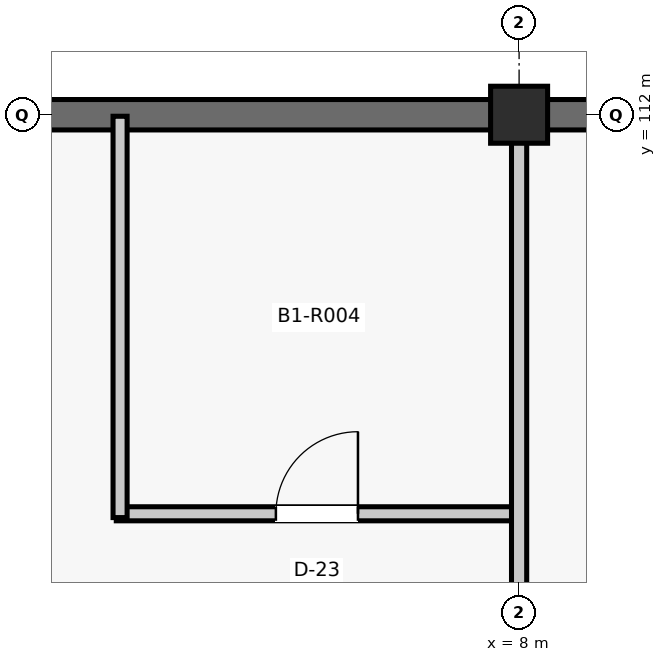
"""IFC4 building model, lengths in metres.
Left out: names, types, materials, properties, quantities, classifications, styles, units other than length and angle.
Written with IfcOpenShell. Run it as: python <this file> out.ifc"""

import sys

from ifc_helpers import new_model, si_unit, direction, frame, frame_2d, origin, origin_2d, place, context, subcontext, project, spatial, rectangle, extrude, element, fill, save


model = new_model("IFC4")
c1 = context("Model", 3, precision=1e-05, world=origin(), true_north=direction((0.0, 1.0)))
c2 = subcontext(c1, "Body", "Model", "MODEL_VIEW")
j1 = project(units=[si_unit("LENGTHUNIT", "METRE"), si_unit("PLANEANGLEUNIT", "RADIAN")], contexts=[c1])
p1 = place(None, origin())
s1 = spatial("IfcSite", under=j1, at=p1, CompositionType="ELEMENT")
p2 = place(p1, origin())
s2 = spatial("IfcBuilding", under=s1, at=p2, CompositionType="ELEMENT")
p3 = place(p2, frame((0.0, 0.0, -4.29)))
s3 = spatial("IfcBuildingStorey", under=s2, at=p3, CompositionType="ELEMENT", Elevation=-4.29)
p4 = place(p3, frame((8.0, 112.0, 0.0), z_axis=(0.0, 0.0, 1.0), x_axis=(1.0, 0.0, 0.0)))
e1 = element("IfcColumn", 1, at=p4, inside=s3, PredefinedType="COLUMN", context=c2, shape_type="SweptSolid", body=[
    extrude(rectangle(XDim=0.75, YDim=0.75, at=origin_2d()), origin(), (0.0, 0.0, 1.0), 4.29),
])
p5 = place(p3, frame((0.36, 112.0, 0.0), z_axis=(0.0, 0.0, 1.0), x_axis=(1.0, 0.0, 0.0)))
e2 = element("IfcWall", 2, at=p5, inside=s3, PredefinedType="SHEAR", context=c2, shape_type="SweptSolid", body=[
    extrude(rectangle(XDim=7.28, YDim=0.4, at=frame_2d((3.64, 0.0))), origin(), (0.0, 0.0, 1.0), 3.654),
])
p6 = place(p3, frame((8.36, 112.0, 0.0), z_axis=(0.0, 0.0, 1.0), x_axis=(1.0, 0.0, 0.0)))
e3 = element("IfcWall", 3, at=p6, inside=s3, PredefinedType="SHEAR", context=c2, shape_type="SweptSolid", body=[
    extrude(rectangle(XDim=7.28, YDim=0.4, at=frame_2d((3.64, 0.0))), origin(), (0.0, 0.0, 1.0), 3.594),
])
p7 = place(p3, frame((2.7, 106.75, 0.0), z_axis=(0.0, 0.0, 1.0), x_axis=(1.0, 0.0, 0.0)))
e4 = element("IfcWall", 4, at=p7, inside=s3, PredefinedType="PARTITIONING", context=c2, shape_type="SweptSolid", body=[
    extrude(rectangle(XDim=5.28, YDim=0.185, at=frame_2d((2.64, 0.0))), origin(), (0.0, 0.0, 1.0), 3.384),
])
p8 = place(p7, frame((2.1, 0.0, 0.0)))
e5 = element("IfcOpeningElement", 5, at=p8, cuts=e4, PredefinedType="OPENING", context=c2, shape_type="SweptSolid", body=[
    extrude(rectangle(XDim=1.08, YDim=2.2, at=frame_2d((0.54, 1.1))), frame((0.0, 0.103, 0.0), z_axis=(0.0, -1.0, 0.0), x_axis=(1.0, 0.0, 0.0)), (0.0, 0.0, 1.0), 0.205),
])
p9 = place(p3, frame((2.75, 106.7, 0.0), z_axis=(0.0, 0.0, 1.0), x_axis=(0.0, 1.0, 0.0)))
e6 = element("IfcWall", 6, at=p9, inside=s3, PredefinedType="PARTITIONING", context=c2, shape_type="SweptSolid", body=[
    extrude(rectangle(XDim=5.28, YDim=0.185, at=frame_2d((2.64, 0.0))), origin(), (0.0, 0.0, 1.0), 3.647),
])
p10 = place(p3, frame((8.0, 104.365, 0.0), z_axis=(0.0, 0.0, 1.0), x_axis=(0.0, 1.0, 0.0)))
e7 = element("IfcWall", 7, at=p10, inside=s3, PredefinedType="PARTITIONING", context=c2, shape_type="SweptSolid", body=[
    extrude(rectangle(XDim=7.27, YDim=0.2, at=frame_2d((3.635, 0.0))), origin(), (0.0, 0.0, 1.0), 3.384),
])
p11 = place(p10, frame((0.52, 0.0, 0.0)))
e8 = element("IfcOpeningElement", 8, at=p11, cuts=e7, PredefinedType="OPENING", context=c2, shape_type="SweptSolid", body=[
    extrude(rectangle(XDim=0.94, YDim=2.12, at=frame_2d((0.47, 1.06))), frame((0.0, 0.11, 0.0), z_axis=(0.0, -1.0, 0.0), x_axis=(1.0, 0.0, 0.0)), (0.0, 0.0, 1.0), 0.22),
])
p12 = place(p8, origin())
e9 = element("IfcDoor", 9, at=p12, inside=s3, OperationType="SINGLE_SWING_RIGHT", PredefinedType="DOOR", context=c2, shape_type="SweptSolid", body=[
    extrude(rectangle(XDim=1.08, YDim=2.2, at=frame_2d((0.54, 1.1))), frame((0.0, 0.025, 0.0), z_axis=(0.0, -1.0, 0.0), x_axis=(1.0, 0.0, 0.0)), (0.0, 0.0, 1.0), 0.05),
])
fill(e5, e9)
save(model, sys.argv[1])
